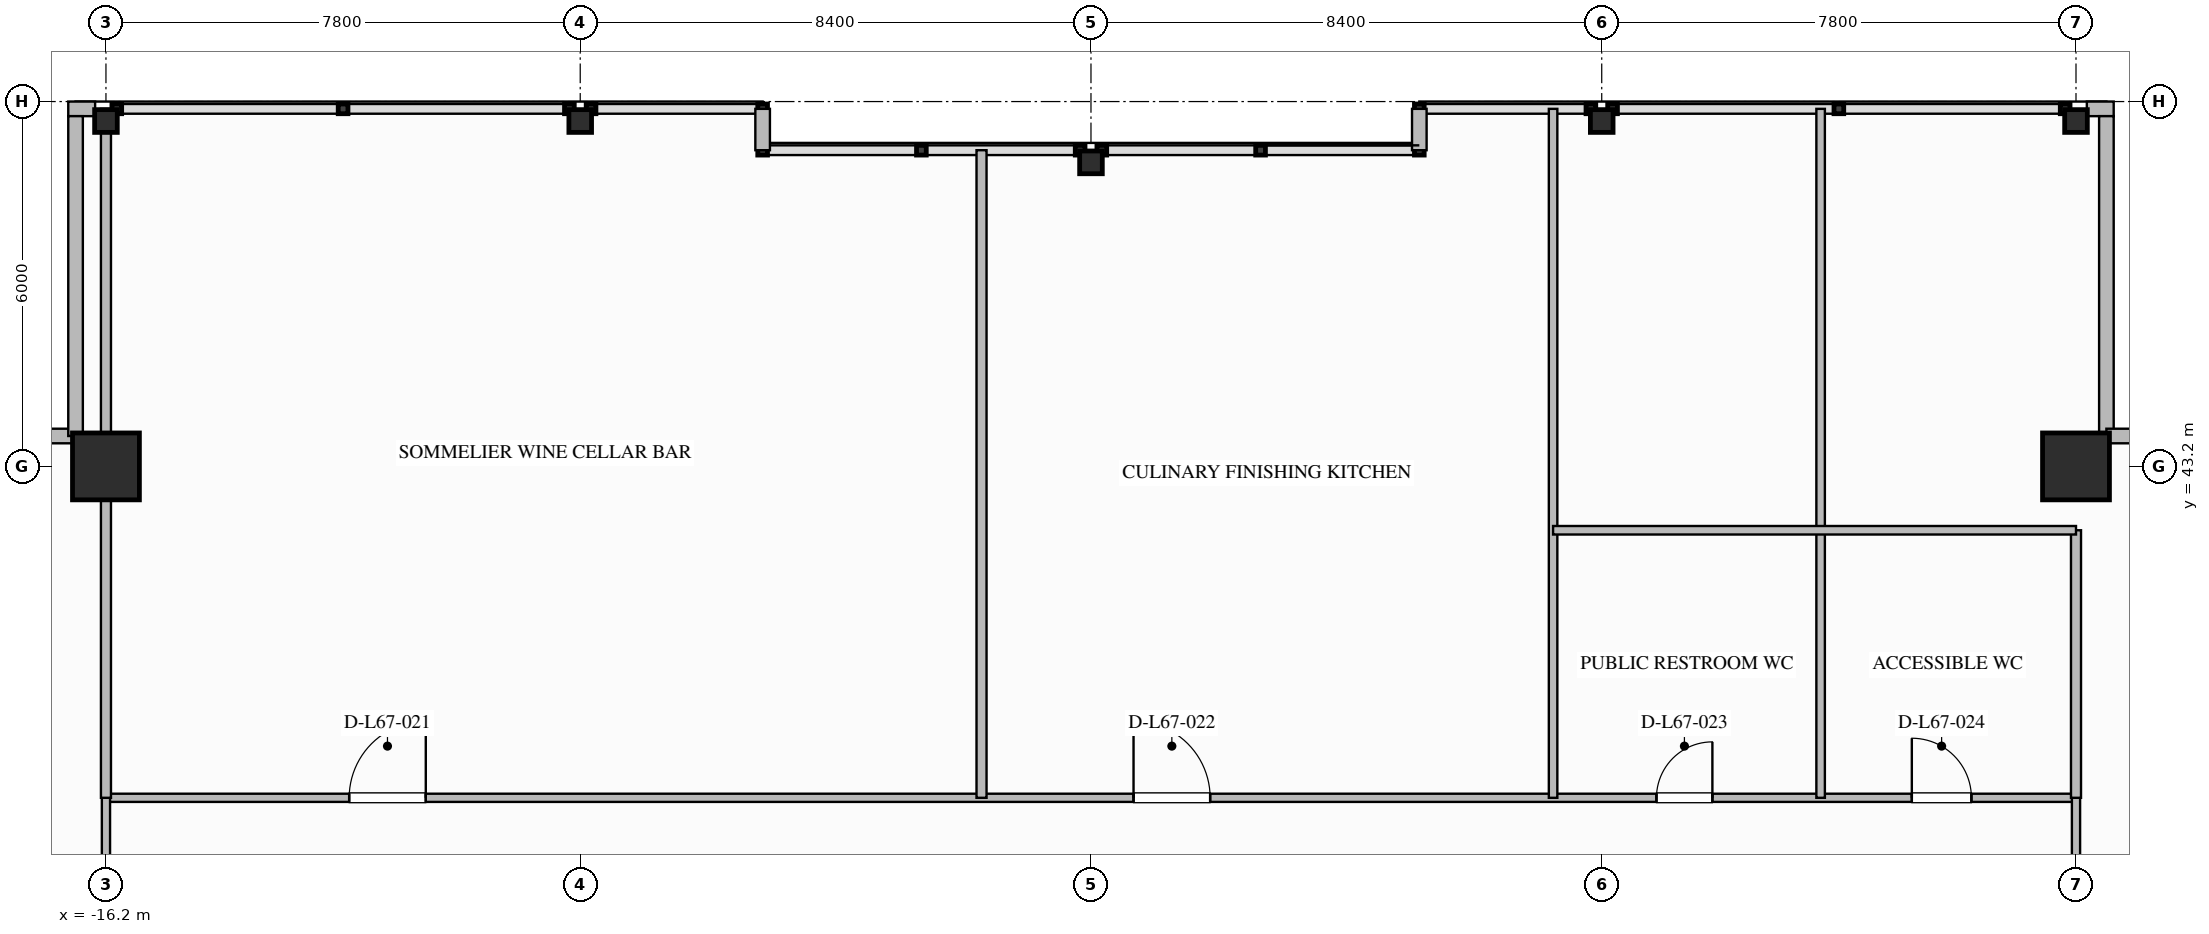
"""IFC4 building model, lengths in metres.
Left out: names, types, materials, properties, quantities, classifications, styles, units other than length and angle.
Written with IfcOpenShell. Run it as: python <this file> out.ifc"""

import sys

from ifc_helpers import new_model, si_unit, direction, frame, frame_2d, origin, origin_2d, place, context, subcontext, project, spatial, rectangle, i_section, extrude, element, fill, save


model = new_model("IFC4")
c1 = context("Model", 3, precision=1e-05, world=origin(), true_north=direction((0.0, 1.0)))
c2 = subcontext(c1, "Body", "Model", "MODEL_VIEW")
j1 = project(units=[si_unit("LENGTHUNIT", "METRE"), si_unit("PLANEANGLEUNIT", "RADIAN")], contexts=[c1])
p1 = place(None, origin())
s1 = spatial("IfcSite", under=j1, at=p1, CompositionType="ELEMENT")
p2 = place(p1, origin())
s2 = spatial("IfcBuilding", under=s1, at=p2, CompositionType="ELEMENT")
p3 = place(p2, frame((0.0, 0.0, 255.5)))
s3 = spatial("IfcBuildingStorey", under=s2, at=p3, CompositionType="ELEMENT", Elevation=255.5)
for number, where, z_axis, x_axis in (
    (1, (-16.2, 43.2, 0.0), (0.0, 0.0, 1.0), (1.0, 0.0, 0.0)),
    (2, (16.2, 43.2, 0.0), (0.0, 0.0, 1.0), (1.0, 0.0, 0.0)),
):
    element("IfcColumn", number, at=place(p3, frame(where, z_axis=z_axis, x_axis=x_axis)), inside=s3, PredefinedType="COLUMN", context=c2, shape_type="SweptSolid", body=[
        extrude(rectangle(XDim=1.1, YDim=1.1, at=origin_2d()), origin(), (0.0, 0.0, 1.0), 4.5),
    ])
for number, where, z_axis, x_axis in (
    (3, (-16.2, 48.88, 0.0), (0.0, 0.0, 1.0), (0.0, 1.0, 0.0)),
    (4, (-8.4, 48.88, 0.0), (0.0, 0.0, 1.0), (0.0, 1.0, 0.0)),
    (5, (0.0, 48.2, 0.0), (0.0, 0.0, 1.0), (0.0, 1.0, 0.0)),
    (6, (8.4, 48.88, 0.0), (0.0, 0.0, 1.0), (0.0, 1.0, 0.0)),
    (7, (16.2, 48.88, 0.0), (0.0, 0.0, 1.0), (0.0, 1.0, 0.0)),
):
    element("IfcColumn", number, at=place(p3, frame(where, z_axis=z_axis, x_axis=x_axis)), inside=s3, PredefinedType="COLUMN", context=c2, shape_type="SweptSolid", body=[
        extrude(i_section(OverallWidth=0.374, OverallDepth=0.372, WebThickness=0.016, FlangeThickness=0.026, FilletRadius=0.025, at=origin_2d()), origin(), (0.0, 0.0, 1.0), 4.497),
    ])
for number, where, z_axis, x_axis in (
    (8, (-16.82, 49.08, 0.0), (0.0, 0.0, 1.0), (1.0, 0.0, 0.0)),
    (9, (16.378, 49.08, 0.0), (0.0, 0.0, 1.0), (1.0, 0.0, 0.0)),
):
    element("IfcWall", number, at=place(p3, frame(where, z_axis=z_axis, x_axis=x_axis)), inside=s3, PredefinedType="STANDARD", context=c2, shape_type="SweptSolid", body=[
        extrude(rectangle(XDim=0.442, YDim=0.24, at=frame_2d((0.221, 0.0))), origin(), (0.0, 0.0, 1.0), 4.18),
    ])
for number, where, z_axis, x_axis in (
    (10, (-21.96, 43.7, 0.0), (0.0, 0.0, 1.0), (1.0, 0.0, 0.0)),
    (11, (-16.7, 43.7, 0.0), (0.0, 0.0, 1.0), (0.0, 1.0, 0.0)),
    (12, (16.7, 48.96, 0.0), (0.0, 0.0, 1.0), (0.0, -1.0, 0.0)),
    (13, (16.7, 43.7, 0.0), (0.0, 0.0, 1.0), (1.0, 0.0, 0.0)),
):
    element("IfcWall", number, at=place(p3, frame(where, z_axis=z_axis, x_axis=x_axis)), inside=s3, PredefinedType="STANDARD", context=c2, shape_type="SweptSolid", body=[
        extrude(rectangle(XDim=5.26, YDim=0.24, at=frame_2d((2.63, 0.0))), origin(), (0.0, 0.0, 1.0), 4.18),
    ])
for number, where, z_axis, x_axis in (
    (14, (-5.4, 49.08, 0.0), (0.0, 0.0, 1.0), (0.0, -1.0, 0.0)),
    (15, (5.4, 48.4, 0.0), (0.0, 0.0, 1.0), (0.0, 1.0, 0.0)),
):
    element("IfcWall", number, at=place(p3, frame(where, z_axis=z_axis, x_axis=x_axis)), inside=s3, PredefinedType="STANDARD", context=c2, shape_type="SweptSolid", body=[
        extrude(rectangle(XDim=0.68, YDim=0.24, at=frame_2d((0.34, 0.0))), origin(), (0.0, 0.0, 1.0), 4.18),
    ])
p4 = place(p3, frame((-16.2, 37.75, 0.0), z_axis=(0.0, 0.0, 1.0), x_axis=(1.0, 0.0, 0.0)))
e16 = element("IfcWall", 16, at=p4, inside=s3, PredefinedType="PARTITIONING", context=c2, shape_type="SweptSolid", body=[
    extrude(rectangle(XDim=32.4, YDim=0.135, at=frame_2d((16.2, 0.0))), origin(), (0.0, 0.0, 1.0), 4.18),
])
p5 = place(p4, frame((4.0, 0.0, 0.0)))
e17 = element("IfcOpeningElement", 17, at=p5, cuts=e16, PredefinedType="OPENING", context=c2, shape_type="SweptSolid", body=[
    extrude(rectangle(XDim=1.26, YDim=2.2, at=frame_2d((0.63, 1.1))), frame((0.0, 0.077, 0.0), z_axis=(0.0, -1.0, 0.0), x_axis=(1.0, 0.0, 0.0)), (0.0, 0.0, 1.0), 0.155),
])
p6 = place(p4, frame((16.9, 0.0, 0.0)))
e18 = element("IfcOpeningElement", 18, at=p6, cuts=e16, PredefinedType="OPENING", context=c2, shape_type="SweptSolid", body=[
    extrude(rectangle(XDim=1.26, YDim=2.2, at=frame_2d((0.63, 1.1))), frame((0.0, 0.077, 0.0), z_axis=(0.0, -1.0, 0.0), x_axis=(1.0, 0.0, 0.0)), (0.0, 0.0, 1.0), 0.155),
])
p7 = place(p4, frame((25.5, 0.0, 0.0)))
e19 = element("IfcOpeningElement", 19, at=p7, cuts=e16, PredefinedType="OPENING", context=c2, shape_type="SweptSolid", body=[
    extrude(rectangle(XDim=0.92, YDim=2.1, at=frame_2d((0.46, 1.05))), frame((0.0, 0.077, 0.0), z_axis=(0.0, -1.0, 0.0), x_axis=(1.0, 0.0, 0.0)), (0.0, 0.0, 1.0), 0.155),
])
p8 = place(p4, frame((29.7, 0.0, 0.0)))
e20 = element("IfcOpeningElement", 20, at=p8, cuts=e16, PredefinedType="OPENING", context=c2, shape_type="SweptSolid", body=[
    extrude(rectangle(XDim=0.98, YDim=2.1, at=frame_2d((0.49, 1.05))), frame((0.0, 0.077, 0.0), z_axis=(0.0, -1.0, 0.0), x_axis=(1.0, 0.0, 0.0)), (0.0, 0.0, 1.0), 0.155),
])
for number, where, z_axis, x_axis in (
    (21, (-16.2, 35.6, 0.0), (0.0, 0.0, 1.0), (0.0, 1.0, 0.0)),
    (22, (16.2, 35.6, 0.0), (0.0, 0.0, 1.0), (0.0, 1.0, 0.0)),
):
    element("IfcWall", number, at=place(p3, frame(where, z_axis=z_axis, x_axis=x_axis)), inside=s3, PredefinedType="PARTITIONING", context=c2, shape_type="SweptSolid", body=[
        extrude(rectangle(XDim=2.15, YDim=0.135, at=frame_2d((1.075, 0.0))), origin(), (0.0, 0.0, 1.0), 3.554),
    ])
p9 = place(p3, frame((-16.2, 37.75, 0.0), z_axis=(0.0, 0.0, 1.0), x_axis=(0.0, 1.0, 0.0)))
e23 = element("IfcWall", 23, at=p9, inside=s3, PredefinedType="PARTITIONING", context=c2, shape_type="SweptSolid", body=[
    extrude(rectangle(XDim=11.33, YDim=0.165, at=frame_2d((5.665, 0.0))), origin(), (0.0, 0.0, 1.0), 3.554),
])
p10 = place(p3, frame((16.2, 37.75, 0.0), z_axis=(0.0, 0.0, 1.0), x_axis=(0.0, 1.0, 0.0)))
e24 = element("IfcWall", 24, at=p10, inside=s3, PredefinedType="PARTITIONING", context=c2, shape_type="SweptSolid", body=[
    extrude(rectangle(XDim=4.4, YDim=0.165, at=frame_2d((2.2, 0.0))), origin(), (0.0, 0.0, 1.0), 3.554),
])
p11 = place(p3, frame((-1.8, 37.75, 0.0), z_axis=(0.0, 0.0, 1.0), x_axis=(0.0, 1.0, 0.0)))
e25 = element("IfcWall", 25, at=p11, inside=s3, PredefinedType="PARTITIONING", context=c2, shape_type="SweptSolid", body=[
    extrude(rectangle(XDim=10.65, YDim=0.165, at=frame_2d((5.325, 0.0))), origin(), (0.0, 0.0, 1.0), 4.18),
])
for number, where, z_axis, x_axis in (
    (26, (7.6, 37.75, 0.0), (0.0, 0.0, 1.0), (0.0, 1.0, 0.0)),
    (27, (12.0, 37.75, 0.0), (0.0, 0.0, 1.0), (0.0, 1.0, 0.0)),
):
    element("IfcWall", number, at=place(p3, frame(where, z_axis=z_axis, x_axis=x_axis)), inside=s3, PredefinedType="PLUMBINGWALL", context=c2, shape_type="SweptSolid", body=[
        extrude(rectangle(XDim=11.33, YDim=0.14, at=frame_2d((5.665, 0.0))), origin(), (0.0, 0.0, 1.0), 4.18),
    ])
p12 = place(p3, frame((7.6, 42.15, 0.0), z_axis=(0.0, 0.0, 1.0), x_axis=(1.0, 0.0, 0.0)))
e28 = element("IfcWall", 28, at=p12, inside=s3, PredefinedType="PLUMBINGWALL", context=c2, shape_type="SweptSolid", body=[
    extrude(rectangle(XDim=8.6, YDim=0.14, at=frame_2d((4.3, 0.0))), origin(), (0.0, 0.0, 1.0), 4.18),
])
p13 = place(p5, origin())
e29 = element("IfcDoor", 29, at=p13, inside=s3, OperationType="SINGLE_SWING_RIGHT", PredefinedType="DOOR", context=c2, shape_type="SweptSolid", body=[
    extrude(rectangle(XDim=1.26, YDim=2.2, at=frame_2d((0.63, 1.1))), frame((0.0, 0.025, 0.0), z_axis=(0.0, -1.0, 0.0), x_axis=(1.0, 0.0, 0.0)), (0.0, 0.0, 1.0), 0.05),
])
fill(e17, e29)
p14 = place(p6, origin())
e30 = element("IfcDoor", 30, at=p14, inside=s3, OperationType="SINGLE_SWING_LEFT", PredefinedType="DOOR", context=c2, shape_type="SweptSolid", body=[
    extrude(rectangle(XDim=1.26, YDim=2.2, at=frame_2d((0.63, 1.1))), frame((0.0, 0.025, 0.0), z_axis=(0.0, -1.0, 0.0), x_axis=(1.0, 0.0, 0.0)), (0.0, 0.0, 1.0), 0.05),
])
fill(e18, e30)
p15 = place(p7, origin())
e31 = element("IfcDoor", 31, at=p15, inside=s3, OperationType="SINGLE_SWING_RIGHT", PredefinedType="DOOR", context=c2, shape_type="SweptSolid", body=[
    extrude(rectangle(XDim=0.92, YDim=2.1, at=frame_2d((0.46, 1.05))), frame((0.0, 0.025, 0.0), z_axis=(0.0, -1.0, 0.0), x_axis=(1.0, 0.0, 0.0)), (0.0, 0.0, 1.0), 0.05),
])
fill(e19, e31)
p16 = place(p8, origin())
e32 = element("IfcDoor", 32, at=p16, inside=s3, OperationType="SINGLE_SWING_LEFT", PredefinedType="DOOR", context=c2, shape_type="SweptSolid", body=[
    extrude(rectangle(XDim=0.98, YDim=2.1, at=frame_2d((0.49, 1.05))), frame((0.0, 0.025, 0.0), z_axis=(0.0, -1.0, 0.0), x_axis=(1.0, 0.0, 0.0)), (0.0, 0.0, 1.0), 0.05),
])
fill(e20, e32)
save(model, sys.argv[1])
